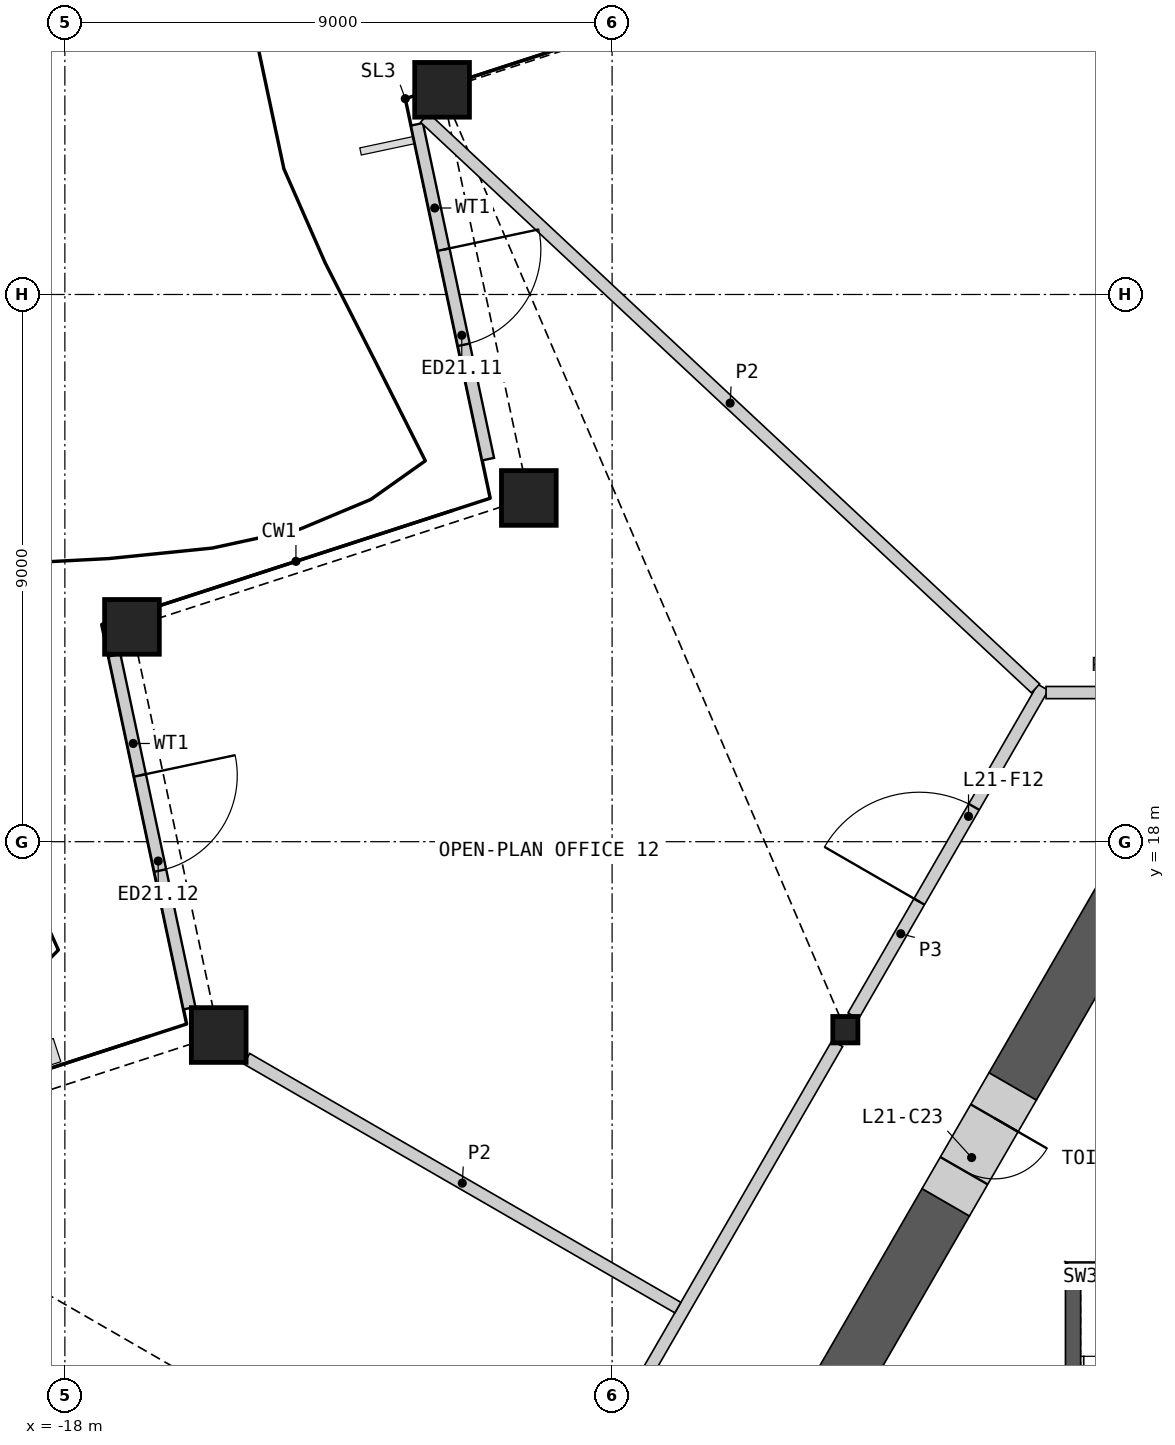
"""IFC4 building model, lengths in metres.
Left out: names, types, materials, properties, quantities, classifications, styles, units other than length and angle.
Written with IfcOpenShell. Run it as: python <this file> out.ifc"""

import sys

from ifc_helpers import new_model, si_unit, direction, frame, frame_2d, origin, origin_2d, place, context, subcontext, project, spatial, polyline, rectangle, hollow_rectangle, i_section, outline, extrude, element, fill, save


model = new_model("IFC4")
c1 = context("Model", 3, precision=1e-05, world=origin(), true_north=direction((0.0, 1.0)))
c2 = subcontext(c1, "Body", "Model", "MODEL_VIEW")
j1 = project(units=[si_unit("LENGTHUNIT", "METRE"), si_unit("PLANEANGLEUNIT", "RADIAN")], contexts=[c1])
p1 = place(None, origin())
s1 = spatial("IfcSite", under=j1, at=p1, CompositionType="ELEMENT")
p2 = place(p1, origin())
s2 = spatial("IfcBuilding", under=s1, at=p2, CompositionType="ELEMENT")
p3 = place(p2, frame((0.0, 0.0, 103.8)))
s3 = spatial("IfcBuildingStorey", under=s2, at=p3, CompositionType="ELEMENT", Elevation=103.8)
for number, where, z_axis, x_axis in (
    (1, (-11.796, 30.366, 0.0), (0.0, 0.0, 1.0), (1.0, 0.0, 0.0)),
    (2, (-10.37, 23.654, 0.0), (0.0, 0.0, 1.0), (1.0, 0.0, 0.0)),
    (3, (-16.896, 21.533, 0.0), (0.0, 0.0, 1.0), (1.0, 0.0, 0.0)),
    (4, (-15.469, 14.82, 0.0), (0.0, 0.0, 1.0), (1.0, 0.0, 0.0)),
):
    element("IfcColumn", number, at=place(p3, frame(where, z_axis=z_axis, x_axis=x_axis)), inside=s3, PredefinedType="COLUMN", context=c2, shape_type="SweptSolid", body=[
        extrude(hollow_rectangle(XDim=0.9, YDim=0.9, WallThickness=0.06, at=origin_2d()), origin(), (0.0, 0.0, 1.0), 4.2),
    ])
p4 = place(p3, frame((-5.164, 14.908, 0.0), z_axis=(0.0, 0.0, 1.0), x_axis=(1.0, 0.0, 0.0)))
e5 = element("IfcColumn", 5, at=p4, inside=s3, PredefinedType="COLUMN", context=c2, shape_type="SweptSolid", body=[
    extrude(i_section(OverallWidth=0.412, OverallDepth=0.435, WebThickness=0.036, FlangeThickness=0.057, at=origin_2d()), origin(), (0.0, 0.0, 1.0), 4.2),
])
p5 = place(p3, frame((-12.21, 29.799, 0.0), z_axis=(0.0, 0.0, 1.0), x_axis=(0.207917875772, -0.978146286061, 0.0)))
e6 = element("IfcWall", 6, at=p5, inside=s3, PredefinedType="SOLIDWALL", context=c2, shape_type="SweptSolid", body=[
    extrude(rectangle(XDim=5.63, YDim=0.2, at=frame_2d((2.815, 0.0))), origin(), (0.0, 0.0, 1.0), 3.189),
])
p6 = place(p5, frame((2.107, 0.0, 0.0)))
e7 = element("IfcOpeningElement", 7, at=p6, cuts=e6, PredefinedType="OPENING", context=c2, shape_type="SweptSolid", body=[
    extrude(rectangle(XDim=1.6, YDim=2.4, at=frame_2d((0.8, 1.2))), frame((0.0, 0.11, 0.0), z_axis=(0.0, -1.0, 0.0), x_axis=(1.0, 0.0, 0.0)), (0.0, 0.0, 1.0), 0.22),
])
p7 = place(p3, frame((-17.185, 21.066, 0.0), z_axis=(0.0, 0.0, 1.0), x_axis=(0.207930102794, -0.978143686966, 0.0)))
e8 = element("IfcWall", 8, at=p7, inside=s3, PredefinedType="SOLIDWALL", context=c2, shape_type="SweptSolid", body=[
    extrude(rectangle(XDim=5.934, YDim=0.2, at=frame_2d((2.967, 0.0))), origin(), (0.0, 0.0, 1.0), 3.189),
])
p8 = place(p7, frame((2.02, 0.0, 0.0)))
e9 = element("IfcOpeningElement", 9, at=p8, cuts=e8, PredefinedType="OPENING", context=c2, shape_type="SweptSolid", body=[
    extrude(rectangle(XDim=1.6, YDim=2.4, at=frame_2d((0.8, 1.2))), frame((0.0, 0.11, 0.0), z_axis=(0.0, -1.0, 0.0), x_axis=(1.0, 0.0, 0.0)), (0.0, 0.0, 1.0), 0.22),
])
p9 = place(p3, origin())
e10 = element("IfcWall", 10, at=p9, inside=s3, PredefinedType="SHEAR", context=c2, shape_type="SweptSolid", body=[
    extrude(outline(polyline([(1.544, 11.087), (-1.544, 11.087), (-1.294, 10.837), (1.294, 10.837), (1.544, 11.087)])), origin(), (0.0, 0.0, 1.0), 3.8),
])
p10 = place(p3, origin())
e11 = element("IfcWall", 11, at=p10, inside=s3, PredefinedType="SHEAR", context=c2, shape_type="SweptSolid", body=[
    extrude(outline(polyline([(-1.294, 10.837), (-1.544, 11.087), (-1.544, 5.237), (-1.294, 5.237), (-1.294, 10.837)])), origin(), (0.0, 0.0, 1.0), 3.8),
])
p11 = place(p3, frame((-3.512, 12.069, 0.0), z_axis=(0.0, 0.0, 1.0), x_axis=(-0.500002126466, -0.866024176065, 0.0)))
e12 = element("IfcWall", 12, at=p11, inside=s3, PredefinedType="SHEAR", context=c2, shape_type="SweptSolid", body=[
    extrude(rectangle(XDim=8.816, YDim=0.9, at=frame_2d((4.408, 0.0))), origin(), (0.0, 0.0, 1.0), 3.8),
])
p12 = place(p3, frame((-0.39, 17.478, 0.0), z_axis=(0.0, 0.0, 1.0), x_axis=(-0.500046330384, -0.865998653272, 0.0)))
e13 = element("IfcWall", 13, at=p12, inside=s3, PredefinedType="SHEAR", context=c2, shape_type="SweptSolid", body=[
    extrude(rectangle(XDim=4.045, YDim=0.9, at=frame_2d((2.023, 0.0))), origin(), (0.0, 0.0, 1.0), 3.8),
])
p13 = place(p3, frame((-2.413, 13.974, 0.0), z_axis=(0.0, 0.0, 1.0), x_axis=(-0.499946605688, -0.86605622881, 0.0)))
e14 = element("IfcWall", 14, at=p13, inside=s3, PredefinedType="SHEAR", context=c2, shape_type="SweptSolid", body=[
    extrude(rectangle(XDim=2.2, YDim=0.9, at=frame_2d((1.1, 0.0))), origin(), (0.0, 0.0, 1.0), 3.8),
])
p14 = place(p13, frame((0.6, 0.0, 0.0)))
e15 = element("IfcOpeningElement", 15, at=p14, cuts=e14, PredefinedType="OPENING", context=c2, shape_type="SweptSolid", body=[
    extrude(rectangle(XDim=1.0, YDim=2.1, at=frame_2d((0.5, 1.05))), frame((0.0, 0.46, 0.0), z_axis=(0.0, -1.0, 0.0), x_axis=(1.0, 0.0, 0.0)), (0.0, 0.0, 1.0), 0.92),
])
p15 = place(p3, frame((-10.197, 6.19, 0.0), z_axis=(0.0, 0.0, 1.0), x_axis=(0.500012035596, 0.866018454918, 0.0)))
e16 = element("IfcWall", 16, at=p15, inside=s3, PredefinedType="PARTITIONING", context=c2, shape_type="SweptSolid", body=[
    extrude(rectangle(XDim=9.803, YDim=0.2, at=frame_2d((4.902, 0.0))), origin(), (0.0, 0.0, 1.0), 3.8),
])
p16 = place(p3, frame((-5.033, 15.135, 0.0), z_axis=(0.0, 0.0, 1.0), x_axis=(0.499980978912, 0.866036385336, 0.0)))
e17 = element("IfcWall", 17, at=p16, inside=s3, PredefinedType="PARTITIONING", context=c2, shape_type="SweptSolid", body=[
    extrude(rectangle(XDim=6.24, YDim=0.2, at=frame_2d((3.12, 0.0))), origin(), (0.0, 0.0, 1.0), 3.8),
])
p17 = place(p16, frame((2.169, 0.0, 0.0)))
e18 = element("IfcOpeningElement", 18, at=p17, cuts=e17, PredefinedType="OPENING", context=c2, shape_type="SweptSolid", body=[
    extrude(rectangle(XDim=1.8, YDim=2.1, at=frame_2d((0.9, 1.05))), frame((0.0, 0.11, 0.0), z_axis=(0.0, -1.0, 0.0), x_axis=(1.0, 0.0, 0.0)), (0.0, 0.0, 1.0), 0.22),
])
p18 = place(p3, frame((-1.863, 20.453, 0.0), z_axis=(0.0, 0.0, 1.0), x_axis=(1.0, 0.0, 0.0)))
e19 = element("IfcWall", 19, at=p18, inside=s3, PredefinedType="PARTITIONING", context=c2, shape_type="SweptSolid", body=[
    extrude(rectangle(XDim=3.726, YDim=0.2, at=frame_2d((1.863, 0.0))), origin(), (0.0, 0.0, 1.0), 3.8),
])
p19 = place(p18, frame((1.363, 0.0, 0.0)))
e20 = element("IfcOpeningElement", 20, at=p19, cuts=e19, PredefinedType="OPENING", context=c2, shape_type="SweptSolid", body=[
    extrude(rectangle(XDim=1.0, YDim=2.1, at=frame_2d((0.5, 1.05))), frame((0.0, 0.11, 0.0), z_axis=(0.0, -1.0, 0.0), x_axis=(1.0, 0.0, 0.0)), (0.0, 0.0, 1.0), 0.22),
])
p20 = place(p3, frame((-12.082, 29.906, 0.0), z_axis=(0.0, 0.0, 1.0), x_axis=(0.730716801277, -0.682680713315, 0.0)))
e21 = element("IfcWall", 21, at=p20, inside=s3, PredefinedType="PARTITIONING", context=c2, shape_type="SweptSolid", body=[
    extrude(rectangle(XDim=13.748, YDim=0.2, at=frame_2d((6.874, 0.0))), origin(), (0.0, 0.0, 1.0), 2.885),
])
p21 = place(p3, frame((-15.01, 14.431, 0.0), z_axis=(0.0, 0.0, 1.0), x_axis=(0.866019738461, -0.5000098125, 0.0)))
e22 = element("IfcWall", 22, at=p21, inside=s3, PredefinedType="PARTITIONING", context=c2, shape_type="SweptSolid", body=[
    extrude(rectangle(XDim=8.188, YDim=0.2, at=frame_2d((4.094, 0.0))), origin(), (0.0, 0.0, 1.0), 2.885),
])
p22 = place(p6, origin())
e23 = element("IfcDoor", 23, at=p22, inside=s3, OperationType="DOUBLE_DOOR_SINGLE_SWING", PredefinedType="DOOR", context=c2, shape_type="SweptSolid", body=[
    extrude(rectangle(XDim=1.6, YDim=2.4, at=frame_2d((0.8, 1.2))), frame((0.0, 0.025, 0.0), z_axis=(0.0, -1.0, 0.0), x_axis=(1.0, 0.0, 0.0)), (0.0, 0.0, 1.0), 0.05),
])
fill(e7, e23)
p23 = place(p8, origin())
e24 = element("IfcDoor", 24, at=p23, inside=s3, OperationType="DOUBLE_DOOR_SINGLE_SWING", PredefinedType="DOOR", context=c2, shape_type="SweptSolid", body=[
    extrude(rectangle(XDim=1.6, YDim=2.4, at=frame_2d((0.8, 1.2))), frame((0.0, 0.025, 0.0), z_axis=(0.0, -1.0, 0.0), x_axis=(1.0, 0.0, 0.0)), (0.0, 0.0, 1.0), 0.05),
])
fill(e9, e24)
p24 = place(p14, origin())
e25 = element("IfcDoor", 25, at=p24, inside=s3, OperationType="SINGLE_SWING_LEFT", PredefinedType="DOOR", context=c2, shape_type="SweptSolid", body=[
    extrude(rectangle(XDim=1.0, YDim=2.1, at=frame_2d((0.5, 1.05))), frame((0.0, 0.205, 0.0), z_axis=(0.0, -1.0, 0.0), x_axis=(1.0, 0.0, 0.0)), (0.0, 0.0, 1.0), 0.05),
])
fill(e15, e25)
p25 = place(p17, origin())
e26 = element("IfcDoor", 26, at=p25, inside=s3, OperationType="DOUBLE_DOOR_SINGLE_SWING", PredefinedType="DOOR", context=c2, shape_type="SweptSolid", body=[
    extrude(rectangle(XDim=1.8, YDim=2.1, at=frame_2d((0.9, 1.05))), frame((0.0, 0.025, 0.0), z_axis=(0.0, -1.0, 0.0), x_axis=(1.0, 0.0, 0.0)), (0.0, 0.0, 1.0), 0.05),
])
fill(e18, e26)
save(model, sys.argv[1])
